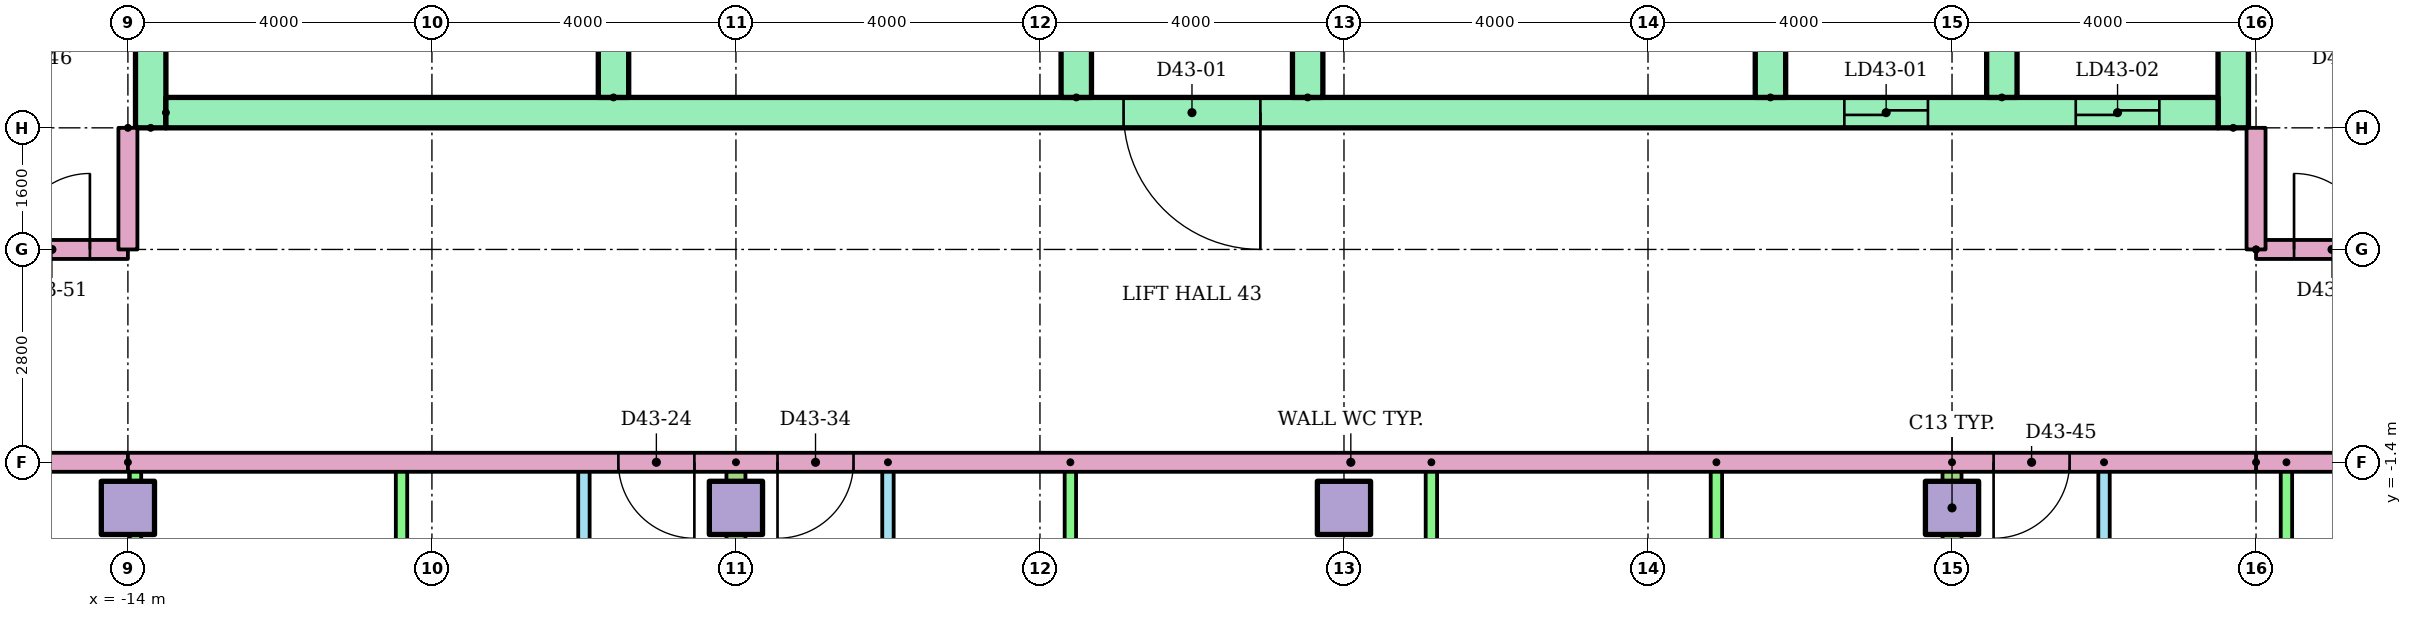
"""IFC4 building model, lengths in metres.
Left out: names, types, materials, properties, quantities, classifications, styles, units other than length and angle.
Written with IfcOpenShell. Run it as: python <this file> out.ifc"""

import sys

from ifc_helpers import new_model, si_unit, direction, frame, frame_2d, origin, origin_2d, place, context, subcontext, project, spatial, rectangle, extrude, element, fill, save


model = new_model("IFC4")
c1 = context("Model", 3, precision=1e-05, world=origin(), true_north=direction((0.0, 1.0)))
c2 = subcontext(c1, "Body", "Model", "MODEL_VIEW")
j1 = project(units=[si_unit("LENGTHUNIT", "METRE"), si_unit("PLANEANGLEUNIT", "RADIAN")], contexts=[c1])
p1 = place(None, origin())
s1 = spatial("IfcSite", under=j1, at=p1, CompositionType="ELEMENT")
p2 = place(p1, origin())
s2 = spatial("IfcBuilding", under=s1, at=p2, CompositionType="ELEMENT")
p3 = place(p2, frame((0.0, 0.0, 168.5)))
s3 = spatial("IfcBuildingStorey", under=s2, at=p3, CompositionType="ELEMENT", Elevation=168.5)
for number, where in (
    (1, (-14.0, -2.0, 0.0)),
    (2, (-6.0, -2.0, 0.0)),
    (3, (2.0, -2.0, 0.0)),
    (4, (10.0, -2.0, 0.0)),
):
    element("IfcColumn", number, at=place(p3, frame(where)), inside=s3, PredefinedType="COLUMN", context=c2, shape_type="SweptSolid", body=[
        extrude(rectangle(XDim=0.7, YDim=0.7, at=origin_2d()), origin(), (0.0, 0.0, 1.0), 3.2),
    ])
for number, where, z_axis, x_axis in (
    (5, (-13.7, 3.0, 0.0), (0.0, 0.0, 1.0), (0.0, 1.0, 0.0)),
    (6, (13.7, 3.0, 0.0), (0.0, 0.0, 1.0), (0.0, 1.0, 0.0)),
):
    element("IfcWall", number, at=place(p3, frame(where, z_axis=z_axis, x_axis=x_axis)), inside=s3, PredefinedType="SHEAR", context=c2, shape_type="SweptSolid", body=[
        extrude(rectangle(XDim=17.0, YDim=0.4, at=frame_2d((8.5, 0.0))), origin(), (0.0, 0.0, 1.0), 2.92),
    ])
p4 = place(p3, frame((-13.5, 3.2, 0.0)))
e7 = element("IfcWall", 7, at=p4, inside=s3, PredefinedType="SHEAR", context=c2, shape_type="SweptSolid", body=[
    extrude(rectangle(XDim=27.0, YDim=0.4, at=frame_2d((13.5, 0.0))), origin(), (0.0, 0.0, 1.0), 2.92),
])
p5 = place(p4, frame((22.083, 0.0, 0.0)))
e8 = element("IfcOpeningElement", 8, at=p5, cuts=e7, PredefinedType="OPENING", context=c2, shape_type="SweptSolid", body=[
    extrude(rectangle(XDim=1.1, YDim=2.1, at=frame_2d((0.55, 1.05))), frame((0.0, 0.21, 0.0), z_axis=(0.0, -1.0, 0.0), x_axis=(1.0, 0.0, 0.0)), (0.0, 0.0, 1.0), 0.42),
])
p6 = place(p4, frame((25.128, 0.0, 0.0)))
e9 = element("IfcOpeningElement", 9, at=p6, cuts=e7, PredefinedType="OPENING", context=c2, shape_type="SweptSolid", body=[
    extrude(rectangle(XDim=1.1, YDim=2.1, at=frame_2d((0.55, 1.05))), frame((0.0, 0.21, 0.0), z_axis=(0.0, -1.0, 0.0), x_axis=(1.0, 0.0, 0.0)), (0.0, 0.0, 1.0), 0.42),
])
p7 = place(p4, frame((12.6, 0.0, 0.0)))
e10 = element("IfcOpeningElement", 10, at=p7, cuts=e7, PredefinedType="OPENING", context=c2, shape_type="SweptSolid", body=[
    extrude(rectangle(XDim=1.8, YDim=2.1, at=frame_2d((0.9, 1.05))), frame((0.0, 0.21, 0.0), z_axis=(0.0, -1.0, 0.0), x_axis=(1.0, 0.0, 0.0)), (0.0, 0.0, 1.0), 0.42),
])
for number, where, z_axis, x_axis in (
    (11, (-7.611, 3.4, 0.0), (0.0, 0.0, 1.0), (0.0, 1.0, 0.0)),
    (12, (-1.522, 3.4, 0.0), (0.0, 0.0, 1.0), (0.0, 1.0, 0.0)),
    (13, (1.522, 3.4, 0.0), (0.0, 0.0, 1.0), (0.0, 1.0, 0.0)),
    (14, (7.611, 3.4, 0.0), (0.0, 0.0, 1.0), (0.0, 1.0, 0.0)),
    (15, (10.656, 3.4, 0.0), (0.0, 0.0, 1.0), (0.0, 1.0, 0.0)),
):
    element("IfcWall", number, at=place(p3, frame(where, z_axis=z_axis, x_axis=x_axis)), inside=s3, PredefinedType="SHEAR", context=c2, shape_type="SweptSolid", body=[
        extrude(rectangle(XDim=3.0, YDim=0.4, at=frame_2d((1.5, 0.0))), origin(), (0.0, 0.0, 1.0), 2.92),
    ])
p8 = place(p3, frame((-8.0, -8.1, 0.0), z_axis=(0.0, 0.0, 1.0), x_axis=(0.0, 1.0, 0.0)))
e16 = element("IfcWall", 16, at=p8, inside=s3, PredefinedType="PARTITIONING", context=c2, shape_type="SweptSolid", body=[
    extrude(rectangle(XDim=6.7, YDim=0.15, at=frame_2d((3.35, 0.0))), origin(), (0.0, 0.0, 1.0), 2.4),
])
p9 = place(p8, frame((4.375, 0.0, 0.0)))
e17 = element("IfcOpeningElement", 17, at=p9, cuts=e16, PredefinedType="OPENING", context=c2, shape_type="SweptSolid", body=[
    extrude(rectangle(XDim=0.9, YDim=2.1, at=frame_2d((0.45, 1.05))), frame((0.0, 0.085, 0.0), z_axis=(0.0, -1.0, 0.0), x_axis=(1.0, 0.0, 0.0)), (0.0, 0.0, 1.0), 0.17),
])
p10 = place(p8, frame((1.075, 0.0, 0.0)))
e18 = element("IfcOpeningElement", 18, at=p10, cuts=e16, PredefinedType="OPENING", context=c2, shape_type="SweptSolid", body=[
    extrude(rectangle(XDim=0.8, YDim=2.1, at=frame_2d((0.4, 1.05))), frame((0.0, 0.085, 0.0), z_axis=(0.0, -1.0, 0.0), x_axis=(1.0, 0.0, 0.0)), (0.0, 0.0, 1.0), 0.17),
])
for number, where, z_axis, x_axis in (
    (19, (-10.4, -8.1, 0.0), (0.0, 0.0, 1.0), (0.0, 1.0, 0.0)),
    (20, (-13.9, -8.1, 0.0), (0.0, 0.0, 1.0), (0.0, 1.0, 0.0)),
):
    element("IfcWall", number, at=place(p3, frame(where, z_axis=z_axis, x_axis=x_axis)), inside=s3, PredefinedType="PARTITIONING", context=c2, shape_type="SweptSolid", body=[
        extrude(rectangle(XDim=6.7, YDim=0.15, at=frame_2d((3.35, 0.0))), origin(), (0.0, 0.0, 1.0), 2.4),
    ])
p11 = place(p3, frame((-4.0, -1.4, 0.0), z_axis=(0.0, 0.0, 1.0), x_axis=(0.0, -1.0, 0.0)))
e21 = element("IfcWall", 21, at=p11, inside=s3, PredefinedType="PARTITIONING", context=c2, shape_type="SweptSolid", body=[
    extrude(rectangle(XDim=6.7, YDim=0.15, at=frame_2d((3.35, 0.0))), origin(), (0.0, 0.0, 1.0), 2.4),
])
p12 = place(p11, frame((1.425, 0.0, 0.0)))
e22 = element("IfcOpeningElement", 22, at=p12, cuts=e21, PredefinedType="OPENING", context=c2, shape_type="SweptSolid", body=[
    extrude(rectangle(XDim=0.9, YDim=2.1, at=frame_2d((0.45, 1.05))), frame((0.0, 0.085, 0.0), z_axis=(0.0, -1.0, 0.0), x_axis=(1.0, 0.0, 0.0)), (0.0, 0.0, 1.0), 0.17),
])
p13 = place(p11, frame((4.825, 0.0, 0.0)))
e23 = element("IfcOpeningElement", 23, at=p13, cuts=e21, PredefinedType="OPENING", context=c2, shape_type="SweptSolid", body=[
    extrude(rectangle(XDim=0.8, YDim=2.1, at=frame_2d((0.4, 1.05))), frame((0.0, 0.085, 0.0), z_axis=(0.0, -1.0, 0.0), x_axis=(1.0, 0.0, 0.0)), (0.0, 0.0, 1.0), 0.17),
])
for number, where, z_axis, x_axis in (
    (24, (-1.6, -1.4, 0.0), (0.0, 0.0, 1.0), (0.0, -1.0, 0.0)),
    (25, (3.15, -1.4, 0.0), (0.0, 0.0, 1.0), (0.0, -1.0, 0.0)),
    (26, (6.9, -1.4, 0.0), (0.0, 0.0, 1.0), (0.0, -1.0, 0.0)),
):
    element("IfcWall", number, at=place(p3, frame(where, z_axis=z_axis, x_axis=x_axis)), inside=s3, PredefinedType="PARTITIONING", context=c2, shape_type="SweptSolid", body=[
        extrude(rectangle(XDim=6.7, YDim=0.15, at=frame_2d((3.35, 0.0))), origin(), (0.0, 0.0, 1.0), 2.4),
    ])
p14 = place(p3, frame((-6.0, -1.4, 0.0), z_axis=(0.0, 0.0, 1.0), x_axis=(0.0, -1.0, 0.0)))
e27 = element("IfcWall", 27, at=p14, inside=s3, PredefinedType="PARTITIONING", context=c2, shape_type="SweptSolid", body=[
    extrude(rectangle(XDim=15.01, YDim=0.25, at=frame_2d((7.505, 0.0))), origin(), (0.0, 0.0, 1.0), 2.4),
])
p15 = place(p3, frame((12.0, -1.4, 0.0), z_axis=(0.0, 0.0, 1.0), x_axis=(0.0, -1.0, 0.0)))
e28 = element("IfcWall", 28, at=p15, inside=s3, PredefinedType="PARTITIONING", context=c2, shape_type="SweptSolid", body=[
    extrude(rectangle(XDim=6.7, YDim=0.15, at=frame_2d((3.35, 0.0))), origin(), (0.0, 0.0, 1.0), 2.4),
])
p16 = place(p15, frame((1.425, 0.0, 0.0)))
e29 = element("IfcOpeningElement", 29, at=p16, cuts=e28, PredefinedType="OPENING", context=c2, shape_type="SweptSolid", body=[
    extrude(rectangle(XDim=0.9, YDim=2.1, at=frame_2d((0.45, 1.05))), frame((0.0, 0.085, 0.0), z_axis=(0.0, -1.0, 0.0), x_axis=(1.0, 0.0, 0.0)), (0.0, 0.0, 1.0), 0.17),
])
p17 = place(p15, frame((4.825, 0.0, 0.0)))
e30 = element("IfcOpeningElement", 30, at=p17, cuts=e28, PredefinedType="OPENING", context=c2, shape_type="SweptSolid", body=[
    extrude(rectangle(XDim=0.8, YDim=2.1, at=frame_2d((0.4, 1.05))), frame((0.0, 0.085, 0.0), z_axis=(0.0, -1.0, 0.0), x_axis=(1.0, 0.0, 0.0)), (0.0, 0.0, 1.0), 0.17),
])
p18 = place(p3, frame((14.4, -1.4, 0.0), z_axis=(0.0, 0.0, 1.0), x_axis=(0.0, -1.0, 0.0)))
e31 = element("IfcWall", 31, at=p18, inside=s3, PredefinedType="PARTITIONING", context=c2, shape_type="SweptSolid", body=[
    extrude(rectangle(XDim=6.7, YDim=0.15, at=frame_2d((3.35, 0.0))), origin(), (0.0, 0.0, 1.0), 2.4),
])
p19 = place(p3, frame((10.0, -1.4, 0.0), z_axis=(0.0, 0.0, 1.0), x_axis=(0.0, -1.0, 0.0)))
e32 = element("IfcWall", 32, at=p19, inside=s3, PredefinedType="PARTITIONING", context=c2, shape_type="SweptSolid", body=[
    extrude(rectangle(XDim=15.01, YDim=0.25, at=frame_2d((7.505, 0.0))), origin(), (0.0, 0.0, 1.0), 2.4),
])
p20 = place(p3, frame((-14.0, -1.4, 0.0), z_axis=(0.0, 0.0, 1.0), x_axis=(-1.0, 0.0, 0.0)))
e33 = element("IfcWall", 33, at=p20, inside=s3, PredefinedType="PARTITIONING", context=c2, shape_type="SweptSolid", body=[
    extrude(rectangle(XDim=10.82, YDim=0.25, at=frame_2d((5.41, 0.0))), origin(), (0.0, 0.0, 1.0), 2.4),
])
p21 = place(p3, frame((29.0, -1.4, 0.0), z_axis=(0.0, 0.0, 1.0), x_axis=(-1.0, 0.0, 0.0)))
e34 = element("IfcWall", 34, at=p21, inside=s3, PredefinedType="PARTITIONING", context=c2, shape_type="SweptSolid", body=[
    extrude(rectangle(XDim=15.0, YDim=0.25, at=frame_2d((7.5, 0.0))), origin(), (0.0, 0.0, 1.0), 2.4),
])
p22 = place(p3, frame((-24.82, 1.4, 0.0)))
e35 = element("IfcWall", 35, at=p22, inside=s3, PredefinedType="PARTITIONING", context=c2, shape_type="SweptSolid", body=[
    extrude(rectangle(XDim=10.82, YDim=0.25, at=frame_2d((5.41, 0.0))), origin(), (0.0, 0.0, 1.0), 2.4),
])
p23 = place(p22, frame((9.32, 0.0, 0.0)))
e36 = element("IfcOpeningElement", 36, at=p23, cuts=e35, PredefinedType="OPENING", context=c2, shape_type="SweptSolid", body=[
    extrude(rectangle(XDim=1.0, YDim=2.1, at=frame_2d((0.5, 1.05))), frame((0.0, 0.135, 0.0), z_axis=(0.0, -1.0, 0.0), x_axis=(1.0, 0.0, 0.0)), (0.0, 0.0, 1.0), 0.27),
])
p24 = place(p3, frame((14.0, 1.4, 0.0)))
e37 = element("IfcWall", 37, at=p24, inside=s3, PredefinedType="PARTITIONING", context=c2, shape_type="SweptSolid", body=[
    extrude(rectangle(XDim=15.0, YDim=0.25, at=frame_2d((7.5, 0.0))), origin(), (0.0, 0.0, 1.0), 2.4),
])
p25 = place(p24, frame((0.5, 0.0, 0.0)))
e38 = element("IfcOpeningElement", 38, at=p25, cuts=e37, PredefinedType="OPENING", context=c2, shape_type="SweptSolid", body=[
    extrude(rectangle(XDim=1.0, YDim=2.1, at=frame_2d((0.5, 1.05))), frame((0.0, 0.135, 0.0), z_axis=(0.0, -1.0, 0.0), x_axis=(1.0, 0.0, 0.0)), (0.0, 0.0, 1.0), 0.27),
])
p26 = place(p24, frame((12.547, 0.0, 0.0)))
e39 = element("IfcOpeningElement", 39, at=p26, cuts=e37, PredefinedType="OPENING", context=c2, shape_type="SweptSolid", body=[
    extrude(rectangle(XDim=1.0, YDim=2.1, at=frame_2d((0.5, 1.05))), frame((0.0, 0.135, 0.0), z_axis=(0.0, -1.0, 0.0), x_axis=(1.0, 0.0, 0.0)), (0.0, 0.0, 1.0), 0.27),
])
p27 = place(p3, frame((14.0, -1.4, 0.0), z_axis=(0.0, 0.0, 1.0), x_axis=(-1.0, 0.0, 0.0)))
e40 = element("IfcWall", 40, at=p27, inside=s3, PredefinedType="PARTITIONING", context=c2, shape_type="SweptSolid", body=[
    extrude(rectangle(XDim=28.0, YDim=0.25, at=frame_2d((14.0, 0.0))), origin(), (0.0, 0.0, 1.0), 2.4),
])
p28 = place(p27, frame((20.547, 0.0, 0.0)))
e41 = element("IfcOpeningElement", 41, at=p28, cuts=e40, PredefinedType="OPENING", context=c2, shape_type="SweptSolid", body=[
    extrude(rectangle(XDim=1.0, YDim=2.1, at=frame_2d((0.5, 1.05))), frame((0.0, 0.135, 0.0), z_axis=(0.0, -1.0, 0.0), x_axis=(1.0, 0.0, 0.0)), (0.0, 0.0, 1.0), 0.27),
])
p29 = place(p27, frame((18.453, 0.0, 0.0)))
e42 = element("IfcOpeningElement", 42, at=p29, cuts=e40, PredefinedType="OPENING", context=c2, shape_type="SweptSolid", body=[
    extrude(rectangle(XDim=1.0, YDim=2.1, at=frame_2d((0.5, 1.05))), frame((0.0, 0.135, 0.0), z_axis=(0.0, -1.0, 0.0), x_axis=(1.0, 0.0, 0.0)), (0.0, 0.0, 1.0), 0.27),
])
p30 = place(p27, frame((2.453, 0.0, 0.0)))
e43 = element("IfcOpeningElement", 43, at=p30, cuts=e40, PredefinedType="OPENING", context=c2, shape_type="SweptSolid", body=[
    extrude(rectangle(XDim=1.0, YDim=2.1, at=frame_2d((0.5, 1.05))), frame((0.0, 0.135, 0.0), z_axis=(0.0, -1.0, 0.0), x_axis=(1.0, 0.0, 0.0)), (0.0, 0.0, 1.0), 0.27),
])
for number, where, z_axis, x_axis in (
    (44, (-14.0, 3.0, 0.0), (0.0, 0.0, 1.0), (0.0, -1.0, 0.0)),
    (45, (14.0, 1.4, 0.0), (0.0, 0.0, 1.0), (0.0, 1.0, 0.0)),
):
    element("IfcWall", number, at=place(p3, frame(where, z_axis=z_axis, x_axis=x_axis)), inside=s3, PredefinedType="PARTITIONING", context=c2, shape_type="SweptSolid", body=[
        extrude(rectangle(XDim=1.6, YDim=0.25, at=frame_2d((0.8, 0.0))), origin(), (0.0, 0.0, 1.0), 2.4),
    ])
p31 = place(p5, origin())
e46 = element("IfcDoor", 46, at=p31, inside=s3, OperationType="SLIDING_TO_LEFT", PredefinedType="DOOR", context=c2, shape_type="SweptSolid", body=[
    extrude(rectangle(XDim=1.1, YDim=2.1, at=frame_2d((0.55, 1.05))), frame((0.0, 0.025, 0.0), z_axis=(0.0, -1.0, 0.0), x_axis=(1.0, 0.0, 0.0)), (0.0, 0.0, 1.0), 0.05),
])
fill(e8, e46)
p32 = place(p6, origin())
e47 = element("IfcDoor", 47, at=p32, inside=s3, OperationType="SLIDING_TO_LEFT", PredefinedType="DOOR", context=c2, shape_type="SweptSolid", body=[
    extrude(rectangle(XDim=1.1, YDim=2.1, at=frame_2d((0.55, 1.05))), frame((0.0, 0.025, 0.0), z_axis=(0.0, -1.0, 0.0), x_axis=(1.0, 0.0, 0.0)), (0.0, 0.0, 1.0), 0.05),
])
fill(e9, e47)
p33 = place(p7, frame((1.8, 0.0, 0.0), z_axis=(0.0, 0.0, 1.0), x_axis=(-1.0, 0.0, 0.0)))
e48 = element("IfcDoor", 48, at=p33, inside=s3, OperationType="DOUBLE_DOOR_SINGLE_SWING", PredefinedType="DOOR", context=c2, shape_type="SweptSolid", body=[
    extrude(rectangle(XDim=1.8, YDim=2.1, at=frame_2d((0.9, 1.05))), frame((0.0, 0.025, 0.0), z_axis=(0.0, -1.0, 0.0), x_axis=(1.0, 0.0, 0.0)), (0.0, 0.0, 1.0), 0.05),
])
fill(e10, e48)
p34 = place(p28, origin())
e49 = element("IfcDoor", 49, at=p34, inside=s3, OperationType="SINGLE_SWING_LEFT", PredefinedType="DOOR", context=c2, shape_type="SweptSolid", body=[
    extrude(rectangle(XDim=1.0, YDim=2.1, at=frame_2d((0.5, 1.05))), frame((0.0, 0.025, 0.0), z_axis=(0.0, -1.0, 0.0), x_axis=(1.0, 0.0, 0.0)), (0.0, 0.0, 1.0), 0.05),
])
fill(e41, e49)
p35 = place(p29, origin())
e50 = element("IfcDoor", 50, at=p35, inside=s3, OperationType="SINGLE_SWING_RIGHT", PredefinedType="DOOR", context=c2, shape_type="SweptSolid", body=[
    extrude(rectangle(XDim=1.0, YDim=2.1, at=frame_2d((0.5, 1.05))), frame((0.0, 0.025, 0.0), z_axis=(0.0, -1.0, 0.0), x_axis=(1.0, 0.0, 0.0)), (0.0, 0.0, 1.0), 0.05),
])
fill(e42, e50)
p36 = place(p30, origin())
e51 = element("IfcDoor", 51, at=p36, inside=s3, OperationType="SINGLE_SWING_RIGHT", PredefinedType="DOOR", context=c2, shape_type="SweptSolid", body=[
    extrude(rectangle(XDim=1.0, YDim=2.1, at=frame_2d((0.5, 1.05))), frame((0.0, 0.025, 0.0), z_axis=(0.0, -1.0, 0.0), x_axis=(1.0, 0.0, 0.0)), (0.0, 0.0, 1.0), 0.05),
])
fill(e43, e51)
p37 = place(p23, origin())
e52 = element("IfcDoor", 52, at=p37, inside=s3, OperationType="SINGLE_SWING_RIGHT", PredefinedType="DOOR", context=c2, shape_type="SweptSolid", body=[
    extrude(rectangle(XDim=1.0, YDim=2.1, at=frame_2d((0.5, 1.05))), frame((0.0, 0.025, 0.0), z_axis=(0.0, -1.0, 0.0), x_axis=(1.0, 0.0, 0.0)), (0.0, 0.0, 1.0), 0.05),
])
fill(e36, e52)
p38 = place(p25, origin())
e53 = element("IfcDoor", 53, at=p38, inside=s3, OperationType="SINGLE_SWING_LEFT", PredefinedType="DOOR", context=c2, shape_type="SweptSolid", body=[
    extrude(rectangle(XDim=1.0, YDim=2.1, at=frame_2d((0.5, 1.05))), frame((0.0, 0.025, 0.0), z_axis=(0.0, -1.0, 0.0), x_axis=(1.0, 0.0, 0.0)), (0.0, 0.0, 1.0), 0.05),
])
fill(e38, e53)
save(model, sys.argv[1])
